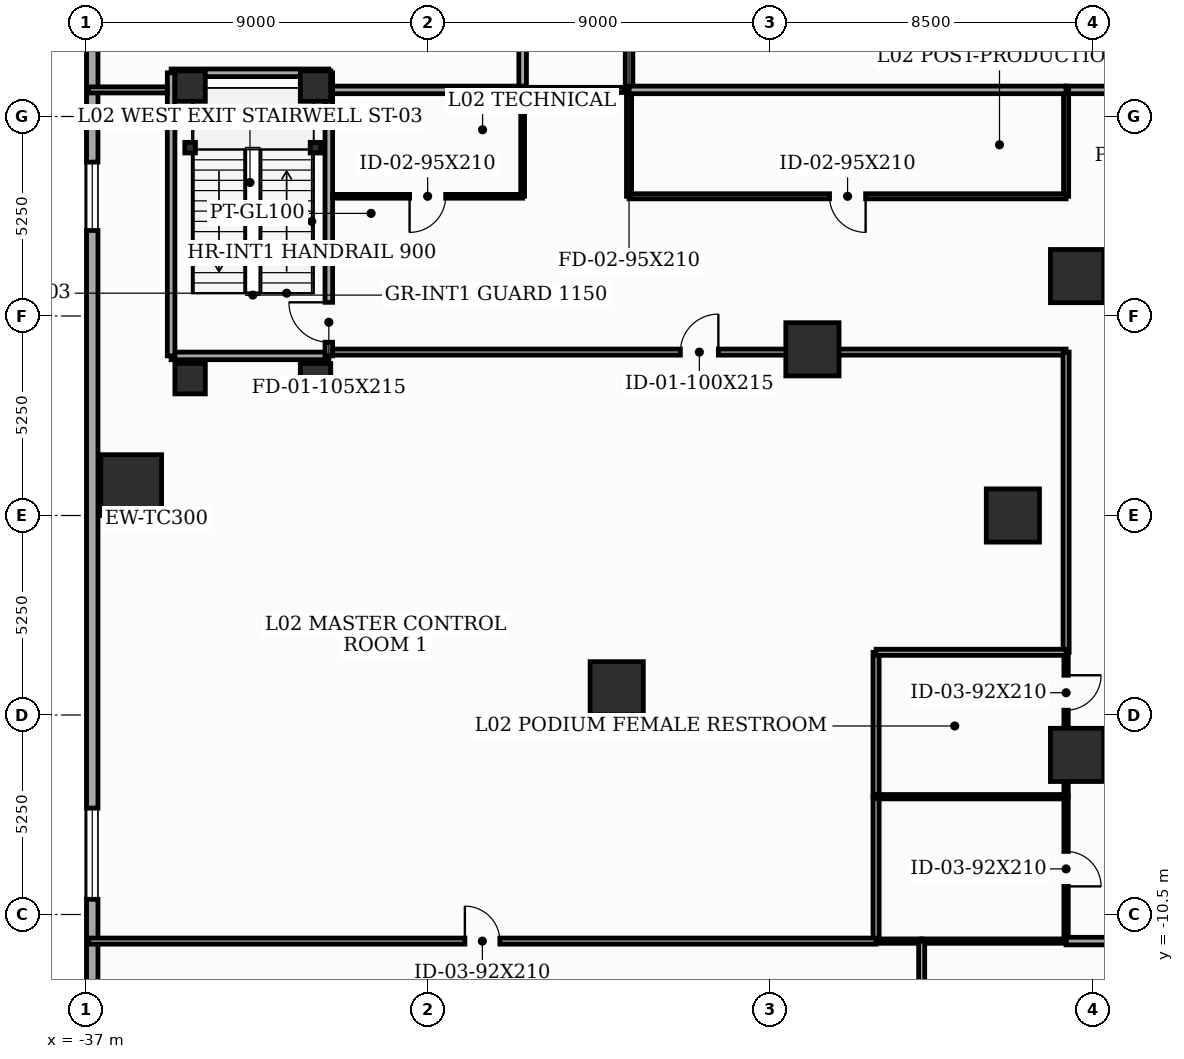
"""IFC4 building model, lengths in metres.
Left out: names, types, materials, properties, quantities, classifications, styles, units other than length and angle.
Written with IfcOpenShell. Run it as: python <this file> out.ifc"""

import sys

from ifc_helpers import new_model, si_unit, direction, frame, frame_2d, origin, origin_2d, place, context, subcontext, project, spatial, rectangle, i_section, extrude, element, fill, save


model = new_model("IFC4")
c1 = context("Model", 3, precision=1e-05, world=origin(), true_north=direction((0.0, 1.0)))
c2 = subcontext(c1, "Body", "Model", "MODEL_VIEW")
j1 = project(units=[si_unit("LENGTHUNIT", "METRE"), si_unit("PLANEANGLEUNIT", "RADIAN")], contexts=[c1])
p1 = place(None, origin())
s1 = spatial("IfcSite", under=j1, at=p1, CompositionType="ELEMENT")
p2 = place(p1, origin())
s2 = spatial("IfcBuilding", under=s1, at=p2, CompositionType="ELEMENT")
p3 = place(p2, frame((0.0, 0.0, 10.4)))
s3 = spatial("IfcBuildingStorey", under=s2, at=p3, CompositionType="ELEMENT", Elevation=10.4)
for number, where, z_axis, x_axis in (
    (1, (-10.912, 6.3, 0.0), (0.0, 0.0, 1.0), (1.0, 0.0, 0.0)),
    (2, (-12.6, 0.0, 0.0), (0.0, 0.0, 1.0), (1.0, 0.0, 0.0)),
    (3, (-10.912, -6.3, 0.0), (0.0, 0.0, 1.0), (1.0, 0.0, 0.0)),
):
    element("IfcColumn", number, at=place(p3, frame(where, z_axis=z_axis, x_axis=x_axis)), inside=s3, PredefinedType="COLUMN", context=c2, shape_type="SweptSolid", body=[
        extrude(rectangle(XDim=1.4, YDim=1.4, at=origin_2d()), origin(), (0.0, 0.0, 1.0), 5.2),
    ])
p4 = place(p3, frame((-35.8, 0.8, 0.0), z_axis=(0.0, 0.0, 1.0), x_axis=(1.0, 0.0, 0.0)))
e4 = element("IfcColumn", 4, at=p4, inside=s3, PredefinedType="COLUMN", context=c2, shape_type="SweptSolid", body=[
    extrude(rectangle(XDim=1.6, YDim=1.6, at=origin_2d()), origin(), (0.0, 0.0, 1.0), 5.2),
])
for number, where, z_axis, x_axis in (
    (5, (-17.875, 4.373, 0.0), (0.0, 0.0, 1.0), (1.0, 0.0, 0.0)),
    (6, (-23.025, -4.547, 0.0), (0.0, 0.0, 1.0), (1.0, 0.0, 0.0)),
):
    element("IfcColumn", number, at=place(p3, frame(where, z_axis=z_axis, x_axis=x_axis)), inside=s3, PredefinedType="COLUMN", context=c2, shape_type="SweptSolid", body=[
        extrude(rectangle(XDim=1.4, YDim=1.4, at=origin_2d()), origin(), (0.0, 0.0, 1.0), 5.2),
    ])
for number, where, z_axis, x_axis in (
    (7, (-34.25, 3.6, 0.0), (0.0, 0.0, 1.0), (1.0, 0.0, 0.0)),
    (8, (-30.95, 3.6, 0.0), (0.0, 0.0, 1.0), (1.0, 0.0, 0.0)),
    (9, (-30.95, 11.3, 0.0), (0.0, 0.0, 1.0), (1.0, 0.0, 0.0)),
    (10, (-34.25, 11.3, 0.0), (0.0, 0.0, 1.0), (1.0, 0.0, 0.0)),
):
    element("IfcColumn", number, at=place(p3, frame(where, z_axis=z_axis, x_axis=x_axis)), inside=s3, PredefinedType="COLUMN", context=c2, shape_type="SweptSolid", body=[
        extrude(rectangle(XDim=0.8, YDim=0.8, at=origin_2d()), origin(), (0.0, 0.0, 1.0), 5.2),
    ])
for number, where, z_axis, x_axis in (
    (11, (-34.25, 9.68, 0.0), (0.0, 0.0, 1.0), (1.0, 0.0, 0.0)),
    (12, (-30.95, 9.68, 0.0), (0.0, 0.0, 1.0), (1.0, 0.0, 0.0)),
):
    element("IfcColumn", number, at=place(p3, frame(where, z_axis=z_axis, x_axis=x_axis)), inside=s3, PredefinedType="PILASTER", context=c2, shape_type="SweptSolid", body=[
        extrude(i_section(OverallWidth=0.28, OverallDepth=0.28, WebThickness=0.01, FlangeThickness=0.018, at=origin_2d()), origin(), (0.0, 0.0, 1.0), 5.2),
    ])
p5 = place(p3, frame((-36.825, 28.5, 0.0), z_axis=(0.0, 0.0, 1.0), x_axis=(0.0, -1.0, 0.0)))
e13 = element("IfcWall", 13, at=p5, inside=s3, PredefinedType="SOLIDWALL", context=c2, shape_type="SweptSolid", body=[
    extrude(rectangle(XDim=48.0, YDim=0.3, at=frame_2d((24.0, 0.0))), origin(), (0.0, 0.0, 1.0), 4.95),
])
p6 = place(p5, frame((6.2, 0.0, 0.9)))
e14 = element("IfcOpeningElement", 14, at=p6, cuts=e13, PredefinedType="OPENING", context=c2, shape_type="SweptSolid", body=[
    extrude(rectangle(XDim=2.4, YDim=1.35, at=frame_2d((1.2, 0.675))), frame((0.0, 0.16, 0.0), z_axis=(0.0, -1.0, 0.0), x_axis=(1.0, 0.0, 0.0)), (0.0, 0.0, 1.0), 0.32),
])
p7 = place(p5, frame((19.2, 0.0, 0.9)))
e15 = element("IfcOpeningElement", 15, at=p7, cuts=e13, PredefinedType="OPENING", context=c2, shape_type="SweptSolid", body=[
    extrude(rectangle(XDim=1.8, YDim=1.35, at=frame_2d((0.9, 0.675))), frame((0.0, 0.16, 0.0), z_axis=(0.0, -1.0, 0.0), x_axis=(1.0, 0.0, 0.0)), (0.0, 0.0, 1.0), 0.32),
])
p8 = place(p5, frame((36.2, 0.0, 0.9)))
e16 = element("IfcOpeningElement", 16, at=p8, cuts=e13, PredefinedType="OPENING", context=c2, shape_type="SweptSolid", body=[
    extrude(rectangle(XDim=2.4, YDim=1.35, at=frame_2d((1.2, 0.675))), frame((0.0, 0.16, 0.0), z_axis=(0.0, -1.0, 0.0), x_axis=(1.0, 0.0, 0.0)), (0.0, 0.0, 1.0), 0.32),
])
p9 = place(p3, frame((-34.75, 4.2, 0.0), z_axis=(0.0, 0.0, 1.0), x_axis=(1.0, 0.0, 0.0)))
e17 = element("IfcWall", 17, at=p9, inside=s3, PredefinedType="SOLIDWALL", context=c2, shape_type="SweptSolid", body=[
    extrude(rectangle(XDim=4.15, YDim=0.2, at=frame_2d((2.075, 0.0))), origin(), (0.0, 0.0, 1.0), 4.95),
])
p10 = place(p3, frame((-30.6, 4.2, 0.0), z_axis=(0.0, 0.0, 1.0), x_axis=(0.0, 1.0, 0.0)))
e18 = element("IfcWall", 18, at=p10, inside=s3, PredefinedType="SOLIDWALL", context=c2, shape_type="SweptSolid", body=[
    extrude(rectangle(XDim=7.45, YDim=0.2, at=frame_2d((3.725, 0.0))), origin(), (0.0, 0.0, 1.0), 4.95),
])
p11 = place(p10, frame((0.36, 0.0, 0.0)))
e19 = element("IfcOpeningElement", 19, at=p11, cuts=e18, PredefinedType="OPENING", context=c2, shape_type="SweptSolid", body=[
    extrude(rectangle(XDim=1.05, YDim=2.15, at=frame_2d((0.525, 1.075))), frame((0.0, 0.11, 0.0), z_axis=(0.0, -1.0, 0.0), x_axis=(1.0, 0.0, 0.0)), (0.0, 0.0, 1.0), 0.22),
])
p12 = place(p3, frame((-30.6, 11.65, 0.0), z_axis=(0.0, 0.0, 1.0), x_axis=(-1.0, 0.0, 0.0)))
e20 = element("IfcWall", 20, at=p12, inside=s3, PredefinedType="SOLIDWALL", context=c2, shape_type="SweptSolid", body=[
    extrude(rectangle(XDim=4.15, YDim=0.2, at=frame_2d((2.075, 0.0))), origin(), (0.0, 0.0, 1.0), 4.95),
])
p13 = place(p3, frame((-34.75, 11.65, 0.0), z_axis=(0.0, 0.0, 1.0), x_axis=(0.0, -1.0, 0.0)))
e21 = element("IfcWall", 21, at=p13, inside=s3, PredefinedType="SOLIDWALL", context=c2, shape_type="SweptSolid", body=[
    extrude(rectangle(XDim=7.45, YDim=0.2, at=frame_2d((3.725, 0.0))), origin(), (0.0, 0.0, 1.0), 4.95),
])
p14 = place(p3, frame((-22.7, 11.2, 0.0), z_axis=(0.0, 0.0, 1.0), x_axis=(-1.0, 0.0, 0.0)))
e22 = element("IfcWall", 22, at=p14, inside=s3, PredefinedType="PARTITIONING", context=c2, shape_type="SweptSolid", body=[
    extrude(rectangle(XDim=2.8, YDim=0.135, at=frame_2d((1.4, 0.0))), origin(), (0.0, 0.0, 1.0), 4.95),
])
p15 = place(p3, frame((-30.5, 4.3, 0.0), z_axis=(0.0, 0.0, 1.0), x_axis=(1.0, 0.0, 0.0)))
e23 = element("IfcWall", 23, at=p15, inside=s3, PredefinedType="PARTITIONING", context=c2, shape_type="SweptSolid", body=[
    extrude(rectangle(XDim=19.3, YDim=0.16, at=frame_2d((9.65, 0.0))), origin(), (0.0, 0.0, 1.0), 3.435),
])
p16 = place(p15, frame((9.15, 0.0, 0.0)))
e24 = element("IfcOpeningElement", 24, at=p16, cuts=e23, PredefinedType="OPENING", context=c2, shape_type="SweptSolid", body=[
    extrude(rectangle(XDim=1.0, YDim=2.15, at=frame_2d((0.5, 1.075))), frame((0.0, 0.09, 0.0), z_axis=(0.0, -1.0, 0.0), x_axis=(1.0, 0.0, 0.0)), (0.0, 0.0, 1.0), 0.18),
])
p17 = place(p3, frame((-11.2, 4.3, 0.0), z_axis=(0.0, 0.0, 1.0), x_axis=(0.0, -1.0, 0.0)))
e25 = element("IfcWall", 25, at=p17, inside=s3, PredefinedType="PARTITIONING", context=c2, shape_type="SweptSolid", body=[
    extrude(rectangle(XDim=7.9, YDim=0.16, at=frame_2d((3.95, 0.0))), origin(), (0.0, 0.0, 1.0), 4.235),
])
p18 = place(p3, frame((-11.2, -3.6, 0.0), z_axis=(0.0, 0.0, 1.0), x_axis=(0.0, -1.0, 0.0)))
e26 = element("IfcWall", 26, at=p18, inside=s3, PredefinedType="PARTITIONING", context=c2, shape_type="SweptSolid", body=[
    extrude(rectangle(XDim=3.8, YDim=0.115, at=frame_2d((1.9, 0.0))), origin(), (0.0, 0.0, 1.0), 4.235),
])
p19 = place(p18, frame((0.604, 0.0, 0.0)))
e27 = element("IfcOpeningElement", 27, at=p19, cuts=e26, PredefinedType="OPENING", context=c2, shape_type="SweptSolid", body=[
    extrude(rectangle(XDim=0.92, YDim=2.1, at=frame_2d((0.46, 1.05))), frame((0.0, 0.067, 0.0), z_axis=(0.0, -1.0, 0.0), x_axis=(1.0, 0.0, 0.0)), (0.0, 0.0, 1.0), 0.135),
])
p20 = place(p3, frame((-11.2, -7.4, 0.0), z_axis=(0.0, 0.0, 1.0), x_axis=(0.0, -1.0, 0.0)))
e28 = element("IfcWall", 28, at=p20, inside=s3, PredefinedType="PARTITIONING", context=c2, shape_type="SweptSolid", body=[
    extrude(rectangle(XDim=3.8, YDim=0.115, at=frame_2d((1.9, 0.0))), origin(), (0.0, 0.0, 1.0), 4.95),
])
p21 = place(p20, frame((1.44, 0.0, 0.0)))
e29 = element("IfcOpeningElement", 29, at=p21, cuts=e28, PredefinedType="OPENING", context=c2, shape_type="SweptSolid", body=[
    extrude(rectangle(XDim=0.92, YDim=2.1, at=frame_2d((0.46, 1.05))), frame((0.0, 0.067, 0.0), z_axis=(0.0, -1.0, 0.0), x_axis=(1.0, 0.0, 0.0)), (0.0, 0.0, 1.0), 0.135),
])
p22 = place(p3, frame((-11.2, -11.2, 0.0), z_axis=(0.0, 0.0, 1.0), x_axis=(1.0, 0.0, 0.0)))
e30 = element("IfcWall", 30, at=p22, inside=s3, PredefinedType="SOLIDWALL", context=c2, shape_type="SweptSolid", body=[
    extrude(rectangle(XDim=15.2, YDim=0.2, at=frame_2d((7.6, 0.0))), origin(), (0.0, 0.0, 1.0), 3.435),
])
p23 = place(p22, frame((7.125, 0.0, 0.0)))
e31 = element("IfcOpeningElement", 31, at=p23, cuts=e30, PredefinedType="OPENING", context=c2, shape_type="SweptSolid", body=[
    extrude(rectangle(XDim=0.95, YDim=2.1, at=frame_2d((0.475, 1.05))), frame((0.0, 0.11, 0.0), z_axis=(0.0, -1.0, 0.0), x_axis=(1.0, 0.0, 0.0)), (0.0, 0.0, 1.0), 0.22),
])
p24 = place(p3, frame((-9.0, 11.2, 0.0), z_axis=(0.0, 0.0, 1.0), x_axis=(-1.0, 0.0, 0.0)))
e32 = element("IfcWall", 32, at=p24, inside=s3, PredefinedType="SOLIDWALL", context=c2, shape_type="SweptSolid", body=[
    extrude(rectangle(XDim=2.2, YDim=0.2, at=frame_2d((1.1, 0.0))), origin(), (0.0, 0.0, 1.0), 4.95),
])
p25 = place(p3, frame((-11.2, 11.2, 0.0), z_axis=(0.0, 0.0, 1.0), x_axis=(0.0, -1.0, 0.0)))
e33 = element("IfcWall", 33, at=p25, inside=s3, PredefinedType="PARTITIONING", context=c2, shape_type="SweptSolid", body=[
    extrude(rectangle(XDim=2.8, YDim=0.135, at=frame_2d((1.4, 0.0))), origin(), (0.0, 0.0, 1.0), 4.95),
])
p26 = place(p3, frame((-11.2, 8.4, 0.0), z_axis=(0.0, 0.0, 1.0), x_axis=(-1.0, 0.0, 0.0)))
e34 = element("IfcWall", 34, at=p26, inside=s3, PredefinedType="PARTITIONING", context=c2, shape_type="SweptSolid", body=[
    extrude(rectangle(XDim=11.5, YDim=0.135, at=frame_2d((5.75, 0.0))), origin(), (0.0, 0.0, 1.0), 4.235),
])
p27 = place(p26, frame((5.275, 0.0, 0.0)))
e35 = element("IfcOpeningElement", 35, at=p27, cuts=e34, PredefinedType="OPENING", context=c2, shape_type="SweptSolid", body=[
    extrude(rectangle(XDim=0.95, YDim=2.1, at=frame_2d((0.475, 1.05))), frame((0.0, 0.077, 0.0), z_axis=(0.0, -1.0, 0.0), x_axis=(1.0, 0.0, 0.0)), (0.0, 0.0, 1.0), 0.155),
])
p28 = place(p3, frame((-22.7, 8.4, 0.0), z_axis=(0.0, 0.0, 1.0), x_axis=(0.0, 1.0, 0.0)))
e36 = element("IfcWall", 36, at=p28, inside=s3, PredefinedType="PARTITIONING", context=c2, shape_type="SweptSolid", body=[
    extrude(rectangle(XDim=2.8, YDim=0.135, at=frame_2d((1.4, 0.0))), origin(), (0.0, 0.0, 1.0), 4.95),
])
p29 = place(p3, frame((-25.5, 11.2, 0.0), z_axis=(0.0, 0.0, 1.0), x_axis=(0.0, -1.0, 0.0)))
e37 = element("IfcWall", 37, at=p29, inside=s3, PredefinedType="MOVABLE", context=c2, shape_type="SweptSolid", body=[
    extrude(rectangle(XDim=2.8, YDim=0.1, at=frame_2d((1.4, 0.0))), origin(), (0.0, 0.0, 1.0), 4.95),
])
p30 = place(p3, frame((-25.5, 8.4, 0.0), z_axis=(0.0, 0.0, 1.0), x_axis=(-1.0, 0.0, 0.0)))
e38 = element("IfcWall", 38, at=p30, inside=s3, PredefinedType="MOVABLE", context=c2, shape_type="SweptSolid", body=[
    extrude(rectangle(XDim=5.0, YDim=0.1, at=frame_2d((2.5, 0.0))), origin(), (0.0, 0.0, 1.0), 4.95),
])
p31 = place(p30, frame((2.025, 0.0, 0.0)))
e39 = element("IfcOpeningElement", 39, at=p31, cuts=e38, PredefinedType="OPENING", context=c2, shape_type="SweptSolid", body=[
    extrude(rectangle(XDim=0.95, YDim=2.1, at=frame_2d((0.475, 1.05))), frame((0.0, 0.06, 0.0), z_axis=(0.0, -1.0, 0.0), x_axis=(1.0, 0.0, 0.0)), (0.0, 0.0, 1.0), 0.12),
])
p32 = place(p3, frame((-25.5, 13.8, 0.0), z_axis=(0.0, 0.0, 1.0), x_axis=(0.0, -1.0, 0.0)))
e40 = element("IfcWall", 40, at=p32, inside=s3, PredefinedType="SOLIDWALL", context=c2, shape_type="SweptSolid", body=[
    extrude(rectangle(XDim=2.6, YDim=0.2, at=frame_2d((1.3, 0.0))), origin(), (0.0, 0.0, 1.0), 4.435),
])
p33 = place(p3, frame((-22.7, 11.2, 0.0), z_axis=(0.0, 0.0, 1.0), x_axis=(0.0, 1.0, 0.0)))
e41 = element("IfcWall", 41, at=p33, inside=s3, PredefinedType="SOLIDWALL", context=c2, shape_type="SweptSolid", body=[
    extrude(rectangle(XDim=7.0, YDim=0.2, at=frame_2d((3.5, 0.0))), origin(), (0.0, 0.0, 1.0), 4.435),
])
p34 = place(p33, frame((3.025, 0.0, 0.0)))
e42 = element("IfcOpeningElement", 42, at=p34, cuts=e41, PredefinedType="OPENING", context=c2, shape_type="SweptSolid", body=[
    extrude(rectangle(XDim=0.95, YDim=2.1, at=frame_2d((0.475, 1.05))), frame((0.0, 0.11, 0.0), z_axis=(0.0, -1.0, 0.0), x_axis=(1.0, 0.0, 0.0)), (0.0, 0.0, 1.0), 0.22),
])
p35 = place(p3, frame((-16.2, -7.4, 0.0), z_axis=(0.0, 0.0, 1.0), x_axis=(0.0, 1.0, 0.0)))
e43 = element("IfcWall", 43, at=p35, inside=s3, PredefinedType="PARTITIONING", context=c2, shape_type="SweptSolid", body=[
    extrude(rectangle(XDim=3.8, YDim=0.16, at=frame_2d((1.9, 0.0))), origin(), (0.0, 0.0, 1.0), 4.235),
])
p36 = place(p3, frame((-16.2, -3.6, 0.0), z_axis=(0.0, 0.0, 1.0), x_axis=(1.0, 0.0, 0.0)))
e44 = element("IfcWall", 44, at=p36, inside=s3, PredefinedType="PARTITIONING", context=c2, shape_type="SweptSolid", body=[
    extrude(rectangle(XDim=5.0, YDim=0.16, at=frame_2d((2.5, 0.0))), origin(), (0.0, 0.0, 1.0), 4.235),
])
p37 = place(p3, frame((-16.2, -11.2, 0.0), z_axis=(0.0, 0.0, 1.0), x_axis=(0.0, 1.0, 0.0)))
e45 = element("IfcWall", 45, at=p37, inside=s3, PredefinedType="PARTITIONING", context=c2, shape_type="SweptSolid", body=[
    extrude(rectangle(XDim=3.8, YDim=0.16, at=frame_2d((1.9, 0.0))), origin(), (0.0, 0.0, 1.0), 4.95),
])
p38 = place(p3, frame((-36.92, -11.2, 0.0), z_axis=(0.0, 0.0, 1.0), x_axis=(1.0, 0.0, 0.0)))
e46 = element("IfcWall", 46, at=p38, inside=s3, PredefinedType="PARTITIONING", context=c2, shape_type="SweptSolid", body=[
    extrude(rectangle(XDim=20.72, YDim=0.16, at=frame_2d((10.36, 0.0))), origin(), (0.0, 0.0, 1.0), 3.435),
])
p39 = place(p38, frame((9.9, 0.0, 0.0)))
e47 = element("IfcOpeningElement", 47, at=p39, cuts=e46, PredefinedType="OPENING", context=c2, shape_type="SweptSolid", body=[
    extrude(rectangle(XDim=0.92, YDim=2.1, at=frame_2d((0.46, 1.05))), frame((0.0, 0.09, 0.0), z_axis=(0.0, -1.0, 0.0), x_axis=(1.0, 0.0, 0.0)), (0.0, 0.0, 1.0), 0.18),
])
p40 = place(p3, frame((-34.85, 11.2, 0.0), z_axis=(0.0, 0.0, 1.0), x_axis=(-1.0, 0.0, 0.0)))
e48 = element("IfcWall", 48, at=p40, inside=s3, PredefinedType="PARTITIONING", context=c2, shape_type="SweptSolid", body=[
    extrude(rectangle(XDim=2.07, YDim=0.16, at=frame_2d((1.035, 0.0))), origin(), (0.0, 0.0, 1.0), 4.235),
])
p41 = place(p3, frame((-16.2, -7.4, 0.0), z_axis=(0.0, 0.0, 1.0), x_axis=(1.0, 0.0, 0.0)))
e49 = element("IfcWall", 49, at=p41, inside=s3, PredefinedType="PARTITIONING", context=c2, shape_type="SweptSolid", body=[
    extrude(rectangle(XDim=5.0, YDim=0.115, at=frame_2d((2.5, 0.0))), origin(), (0.0, 0.0, 1.0), 4.95),
])
p42 = place(p3, frame((-16.2, -11.2, 0.0), z_axis=(0.0, 0.0, 1.0), x_axis=(1.0, 0.0, 0.0)))
e50 = element("IfcWall", 50, at=p42, inside=s3, PredefinedType="PARTITIONING", context=c2, shape_type="SweptSolid", body=[
    extrude(rectangle(XDim=1.2, YDim=0.115, at=frame_2d((0.6, 0.0))), origin(), (0.0, 0.0, 1.0), 4.95),
])
p43 = place(p3, frame((-15.0, -11.2, 0.0), z_axis=(0.0, 0.0, 1.0), x_axis=(1.0, 0.0, 0.0)))
e51 = element("IfcWall", 51, at=p43, inside=s3, PredefinedType="PARTITIONING", context=c2, shape_type="SweptSolid", body=[
    extrude(rectangle(XDim=3.8, YDim=0.115, at=frame_2d((1.9, 0.0))), origin(), (0.0, 0.0, 1.0), 4.95),
])
p44 = place(p3, frame((-15.0, -24.42, 0.0), z_axis=(0.0, 0.0, 1.0), x_axis=(0.0, 1.0, 0.0)))
e52 = element("IfcWall", 52, at=p44, inside=s3, PredefinedType="PARTITIONING", context=c2, shape_type="SweptSolid", body=[
    extrude(rectangle(XDim=13.22, YDim=0.16, at=frame_2d((6.61, 0.0))), origin(), (0.0, 0.0, 1.0), 3.435),
])
p45 = place(p3, frame((-22.7, 11.2, 0.0), z_axis=(0.0, 0.0, 1.0), x_axis=(1.0, 0.0, 0.0)))
e53 = element("IfcWall", 53, at=p45, inside=s3, PredefinedType="SOLIDWALL", context=c2, shape_type="SweptSolid", body=[
    extrude(rectangle(XDim=11.5, YDim=0.2, at=frame_2d((5.75, 0.0))), origin(), (0.0, 0.0, 1.0), 4.235),
])
p46 = place(p3, frame((-30.5, 11.2, 0.0), z_axis=(0.0, 0.0, 1.0), x_axis=(1.0, 0.0, 0.0)))
e54 = element("IfcWall", 54, at=p46, inside=s3, PredefinedType="SOLIDWALL", context=c2, shape_type="SweptSolid", body=[
    extrude(rectangle(XDim=5.0, YDim=0.2, at=frame_2d((2.5, 0.0))), origin(), (0.0, 0.0, 1.0), 4.95),
])
p47 = place(p7, origin())
e55 = element("IfcWindow", 55, at=p47, inside=s3, PartitioningType="SINGLE_PANEL", PredefinedType="WINDOW", context=c2, shape_type="SweptSolid", body=[
    extrude(rectangle(XDim=1.8, YDim=1.35, at=frame_2d((0.9, 0.675))), frame((0.0, 0.03, 0.0), z_axis=(0.0, -1.0, 0.0), x_axis=(1.0, 0.0, 0.0)), (0.0, 0.0, 1.0), 0.06),
])
fill(e15, e55)
p48 = place(p8, origin())
e56 = element("IfcWindow", 56, at=p48, inside=s3, PartitioningType="SINGLE_PANEL", PredefinedType="WINDOW", context=c2, shape_type="SweptSolid", body=[
    extrude(rectangle(XDim=2.4, YDim=1.35, at=frame_2d((1.2, 0.675))), frame((0.0, 0.03, 0.0), z_axis=(0.0, -1.0, 0.0), x_axis=(1.0, 0.0, 0.0)), (0.0, 0.0, 1.0), 0.06),
])
fill(e16, e56)
p49 = place(p11, origin())
e57 = element("IfcDoor", 57, at=p49, inside=s3, OperationType="SINGLE_SWING_RIGHT", PredefinedType="DOOR", context=c2, shape_type="SweptSolid", body=[
    extrude(rectangle(XDim=1.05, YDim=2.15, at=frame_2d((0.525, 1.075))), frame((0.0, 0.025, 0.0), z_axis=(0.0, -1.0, 0.0), x_axis=(1.0, 0.0, 0.0)), (0.0, 0.0, 1.0), 0.05),
])
fill(e19, e57)
p50 = place(p16, origin())
e58 = element("IfcDoor", 58, at=p50, inside=s3, OperationType="SINGLE_SWING_RIGHT", PredefinedType="DOOR", context=c2, shape_type="SweptSolid", body=[
    extrude(rectangle(XDim=1.0, YDim=2.15, at=frame_2d((0.5, 1.075))), frame((0.0, 0.025, 0.0), z_axis=(0.0, -1.0, 0.0), x_axis=(1.0, 0.0, 0.0)), (0.0, 0.0, 1.0), 0.05),
])
fill(e24, e58)
p51 = place(p19, origin())
e59 = element("IfcDoor", 59, at=p51, inside=s3, OperationType="SINGLE_SWING_LEFT", PredefinedType="DOOR", context=c2, shape_type="SweptSolid", body=[
    extrude(rectangle(XDim=0.92, YDim=2.1, at=frame_2d((0.46, 1.05))), frame((0.0, 0.025, 0.0), z_axis=(0.0, -1.0, 0.0), x_axis=(1.0, 0.0, 0.0)), (0.0, 0.0, 1.0), 0.05),
])
fill(e27, e59)
p52 = place(p21, origin())
e60 = element("IfcDoor", 60, at=p52, inside=s3, OperationType="SINGLE_SWING_RIGHT", PredefinedType="DOOR", context=c2, shape_type="SweptSolid", body=[
    extrude(rectangle(XDim=0.92, YDim=2.1, at=frame_2d((0.46, 1.05))), frame((0.0, 0.025, 0.0), z_axis=(0.0, -1.0, 0.0), x_axis=(1.0, 0.0, 0.0)), (0.0, 0.0, 1.0), 0.05),
])
fill(e29, e60)
p53 = place(p27, origin())
e61 = element("IfcDoor", 61, at=p53, inside=s3, OperationType="SINGLE_SWING_LEFT", PredefinedType="DOOR", context=c2, shape_type="SweptSolid", body=[
    extrude(rectangle(XDim=0.95, YDim=2.1, at=frame_2d((0.475, 1.05))), frame((0.0, 0.025, 0.0), z_axis=(0.0, -1.0, 0.0), x_axis=(1.0, 0.0, 0.0)), (0.0, 0.0, 1.0), 0.05),
])
fill(e35, e61)
p54 = place(p31, origin())
e62 = element("IfcDoor", 62, at=p54, inside=s3, OperationType="SINGLE_SWING_RIGHT", PredefinedType="DOOR", context=c2, shape_type="SweptSolid", body=[
    extrude(rectangle(XDim=0.95, YDim=2.1, at=frame_2d((0.475, 1.05))), frame((0.0, 0.025, 0.0), z_axis=(0.0, -1.0, 0.0), x_axis=(1.0, 0.0, 0.0)), (0.0, 0.0, 1.0), 0.05),
])
fill(e39, e62)
p55 = place(p39, origin())
e63 = element("IfcDoor", 63, at=p55, inside=s3, OperationType="SINGLE_SWING_LEFT", PredefinedType="DOOR", context=c2, shape_type="SweptSolid", body=[
    extrude(rectangle(XDim=0.92, YDim=2.1, at=frame_2d((0.46, 1.05))), frame((0.0, 0.025, 0.0), z_axis=(0.0, -1.0, 0.0), x_axis=(1.0, 0.0, 0.0)), (0.0, 0.0, 1.0), 0.05),
])
fill(e47, e63)
save(model, sys.argv[1])
